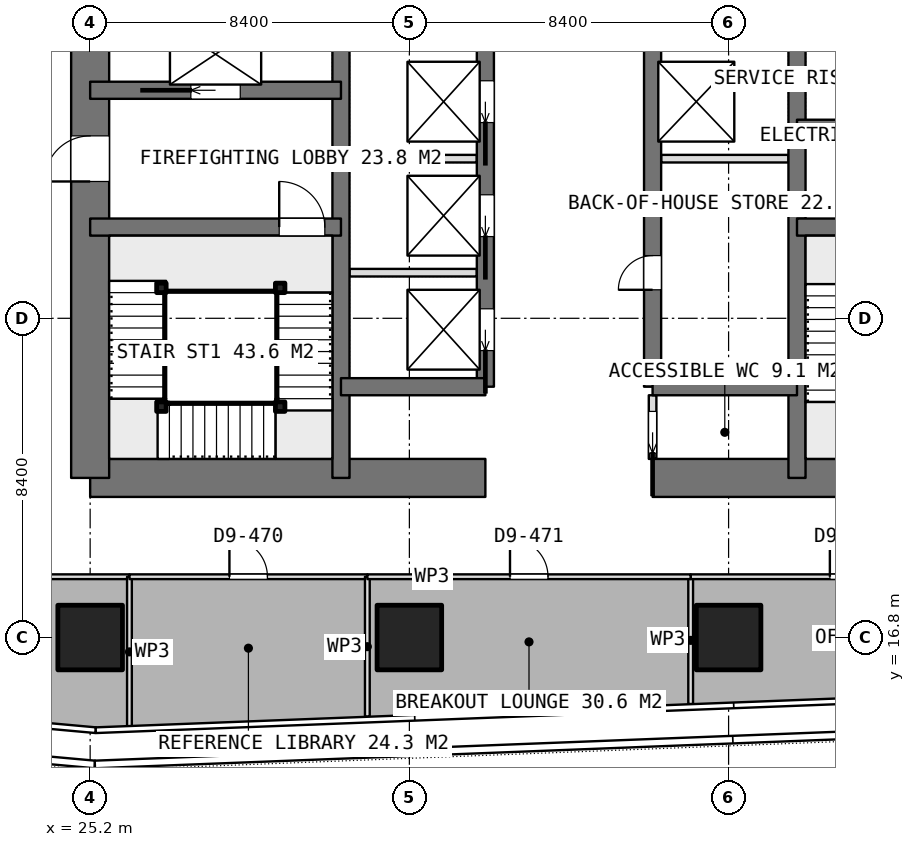
"""IFC4 building model, lengths in metres.
Left out: names, types, materials, properties, quantities, classifications, styles, units other than length and angle.
Written with IfcOpenShell. Run it as: python <this file> out.ifc"""

import sys

from ifc_helpers import new_model, si_unit, direction, frame, frame_2d, origin, origin_2d, place, context, subcontext, project, spatial, rectangle, extrude, element, fill, save


model = new_model("IFC4")
c1 = context("Model", 3, precision=1e-05, world=origin(), true_north=direction((0.0, 1.0)))
c2 = subcontext(c1, "Body", "Model", "MODEL_VIEW")
j1 = project(units=[si_unit("LENGTHUNIT", "METRE"), si_unit("PLANEANGLEUNIT", "RADIAN")], contexts=[c1])
p1 = place(None, origin())
s1 = spatial("IfcSite", under=j1, at=p1, CompositionType="ELEMENT")
p2 = place(p1, origin())
s2 = spatial("IfcBuilding", under=s1, at=p2, CompositionType="ELEMENT")
p3 = place(p2, frame((0.0, 0.0, 125.3)))
s3 = spatial("IfcBuildingStorey", under=s2, at=p3, CompositionType="ELEMENT", Elevation=125.3)
p4 = place(p3, frame((25.2, 21.0, 0.0), z_axis=(0.0, 0.0, 1.0), x_axis=(1.0, 0.0, 0.0)))
e1 = element("IfcWall", 1, at=p4, inside=s3, PredefinedType="SHEAR", context=c2, shape_type="SweptSolid", body=[
    extrude(rectangle(XDim=10.4, YDim=1.0, at=frame_2d((5.2, 0.0))), origin(), (0.0, 0.0, 1.0), 3.75),
])
p5 = place(p3, frame((40.0, 21.0, 0.0), z_axis=(0.0, 0.0, 1.0), x_axis=(1.0, 0.0, 0.0)))
e2 = element("IfcWall", 2, at=p5, inside=s3, PredefinedType="SHEAR", context=c2, shape_type="SweptSolid", body=[
    extrude(rectangle(XDim=10.4, YDim=1.0, at=frame_2d((5.2, 0.0))), origin(), (0.0, 0.0, 1.0), 3.75),
])
p6 = place(p3, frame((25.2, 21.0, 0.0), z_axis=(0.0, 0.0, 1.0), x_axis=(0.0, 1.0, 0.0)))
e3 = element("IfcWall", 3, at=p6, inside=s3, PredefinedType="SHEAR", context=c2, shape_type="SweptSolid", body=[
    extrude(rectangle(XDim=25.2, YDim=1.0, at=frame_2d((12.6, 0.0))), origin(), (0.0, 0.0, 1.0), 3.75),
])
p7 = place(p6, frame((7.8, 0.0, 0.0)))
e4 = element("IfcOpeningElement", 4, at=p7, cuts=e3, PredefinedType="OPENING", context=c2, shape_type="SweptSolid", body=[
    extrude(rectangle(XDim=1.2, YDim=2.1, at=frame_2d((0.6, 1.05))), frame((0.0, 0.51, 0.0), z_axis=(0.0, -1.0, 0.0), x_axis=(1.0, 0.0, 0.0)), (0.0, 0.0, 1.0), 1.02),
])
p8 = place(p6, frame((14.25, 0.0, 0.0)))
e5 = element("IfcOpeningElement", 5, at=p8, cuts=e3, PredefinedType="OPENING", context=c2, shape_type="SweptSolid", body=[
    extrude(rectangle(XDim=0.9, YDim=2.1, at=frame_2d((0.45, 1.05))), frame((0.0, 0.51, 0.0), z_axis=(0.0, -1.0, 0.0), x_axis=(1.0, 0.0, 0.0)), (0.0, 0.0, 1.0), 1.02),
])
p9 = place(p6, frame((16.85, 0.0, 0.0)))
e6 = element("IfcOpeningElement", 6, at=p9, cuts=e3, PredefinedType="OPENING", context=c2, shape_type="SweptSolid", body=[
    extrude(rectangle(XDim=0.9, YDim=2.1, at=frame_2d((0.45, 1.05))), frame((0.0, 0.51, 0.0), z_axis=(0.0, -1.0, 0.0), x_axis=(1.0, 0.0, 0.0)), (0.0, 0.0, 1.0), 1.02),
])
p10 = place(p6, frame((19.025, 0.0, 0.0)))
e7 = element("IfcOpeningElement", 7, at=p10, cuts=e3, PredefinedType="OPENING", context=c2, shape_type="SweptSolid", body=[
    extrude(rectangle(XDim=1.2, YDim=2.1, at=frame_2d((0.6, 1.05))), frame((0.0, 0.51, 0.0), z_axis=(0.0, -1.0, 0.0), x_axis=(1.0, 0.0, 0.0)), (0.0, 0.0, 1.0), 1.02),
])
for number, where, z_axis, x_axis in (
    (8, (31.8, 21.0, 0.0), (0.0, 0.0, 1.0), (0.0, 1.0, 0.0)),
    (9, (43.8, 21.0, 0.0), (0.0, 0.0, 1.0), (0.0, 1.0, 0.0)),
):
    element("IfcWall", number, at=place(p3, frame(where, z_axis=z_axis, x_axis=x_axis)), inside=s3, PredefinedType="SHEAR", context=c2, shape_type="SweptSolid", body=[
        extrude(rectangle(XDim=25.2, YDim=0.45, at=frame_2d((12.6, 0.0))), origin(), (0.0, 0.0, 1.0), 3.75),
    ])
p11 = place(p3, frame((35.6, 23.4, 0.0), z_axis=(0.0, 0.0, 1.0), x_axis=(0.0, 1.0, 0.0)))
e10 = element("IfcWall", 10, at=p11, inside=s3, PredefinedType="SHEAR", context=c2, shape_type="SweptSolid", body=[
    extrude(rectangle(XDim=18.0, YDim=0.45, at=frame_2d((9.0, 0.0))), origin(), (0.0, 0.0, 1.0), 3.75),
])
p12 = place(p11, frame((0.95, 0.0, 0.0)))
e11 = element("IfcOpeningElement", 11, at=p12, cuts=e10, PredefinedType="OPENING", context=c2, shape_type="SweptSolid", body=[
    extrude(rectangle(XDim=1.1, YDim=2.1, at=frame_2d((0.55, 1.05))), frame((0.0, 0.235, 0.0), z_axis=(0.0, -1.0, 0.0), x_axis=(1.0, 0.0, 0.0)), (0.0, 0.0, 1.0), 0.47),
])
p13 = place(p11, frame((3.95, 0.0, 0.0)))
e12 = element("IfcOpeningElement", 12, at=p13, cuts=e10, PredefinedType="OPENING", context=c2, shape_type="SweptSolid", body=[
    extrude(rectangle(XDim=1.1, YDim=2.1, at=frame_2d((0.55, 1.05))), frame((0.0, 0.235, 0.0), z_axis=(0.0, -1.0, 0.0), x_axis=(1.0, 0.0, 0.0)), (0.0, 0.0, 1.0), 0.47),
])
p14 = place(p11, frame((6.95, 0.0, 0.0)))
e13 = element("IfcOpeningElement", 13, at=p14, cuts=e10, PredefinedType="OPENING", context=c2, shape_type="SweptSolid", body=[
    extrude(rectangle(XDim=1.1, YDim=2.1, at=frame_2d((0.55, 1.05))), frame((0.0, 0.235, 0.0), z_axis=(0.0, -1.0, 0.0), x_axis=(1.0, 0.0, 0.0)), (0.0, 0.0, 1.0), 0.47),
])
p15 = place(p11, frame((9.95, 0.0, 0.0)))
e14 = element("IfcOpeningElement", 14, at=p15, cuts=e10, PredefinedType="OPENING", context=c2, shape_type="SweptSolid", body=[
    extrude(rectangle(XDim=1.1, YDim=2.1, at=frame_2d((0.55, 1.05))), frame((0.0, 0.235, 0.0), z_axis=(0.0, -1.0, 0.0), x_axis=(1.0, 0.0, 0.0)), (0.0, 0.0, 1.0), 0.47),
])
p16 = place(p11, frame((12.95, 0.0, 0.0)))
e15 = element("IfcOpeningElement", 15, at=p16, cuts=e10, PredefinedType="OPENING", context=c2, shape_type="SweptSolid", body=[
    extrude(rectangle(XDim=1.1, YDim=2.1, at=frame_2d((0.55, 1.05))), frame((0.0, 0.235, 0.0), z_axis=(0.0, -1.0, 0.0), x_axis=(1.0, 0.0, 0.0)), (0.0, 0.0, 1.0), 0.47),
])
p17 = place(p11, frame((15.95, 0.0, 0.0)))
e16 = element("IfcOpeningElement", 16, at=p17, cuts=e10, PredefinedType="OPENING", context=c2, shape_type="SweptSolid", body=[
    extrude(rectangle(XDim=1.1, YDim=2.1, at=frame_2d((0.55, 1.05))), frame((0.0, 0.235, 0.0), z_axis=(0.0, -1.0, 0.0), x_axis=(1.0, 0.0, 0.0)), (0.0, 0.0, 1.0), 0.47),
])
p18 = place(p3, frame((40.0, 23.4, 0.0), z_axis=(0.0, 0.0, 1.0), x_axis=(0.0, 1.0, 0.0)))
e17 = element("IfcWall", 17, at=p18, inside=s3, PredefinedType="SHEAR", context=c2, shape_type="SweptSolid", body=[
    extrude(rectangle(XDim=18.0, YDim=0.45, at=frame_2d((9.0, 0.0))), origin(), (0.0, 0.0, 1.0), 3.75),
])
p19 = place(p18, frame((2.55, 0.0, 0.0)))
e18 = element("IfcOpeningElement", 18, at=p19, cuts=e17, PredefinedType="OPENING", context=c2, shape_type="SweptSolid", body=[
    extrude(rectangle(XDim=0.9, YDim=2.1, at=frame_2d((0.45, 1.05))), frame((0.0, 0.235, 0.0), z_axis=(0.0, -1.0, 0.0), x_axis=(1.0, 0.0, 0.0)), (0.0, 0.0, 1.0), 0.47),
])
for number, where, z_axis, x_axis in (
    (19, (31.8, 23.4, 0.0), (0.0, 0.0, 1.0), (1.0, 0.0, 0.0)),
    (20, (40.0, 23.4, 0.0), (0.0, 0.0, 1.0), (1.0, 0.0, 0.0)),
):
    element("IfcWall", number, at=place(p3, frame(where, z_axis=z_axis, x_axis=x_axis)), inside=s3, PredefinedType="SHEAR", context=c2, shape_type="SweptSolid", body=[
        extrude(rectangle(XDim=3.8, YDim=0.45, at=frame_2d((1.9, 0.0))), origin(), (0.0, 0.0, 1.0), 3.75),
    ])
p20 = place(p3, frame((25.2, 27.6, 0.0), z_axis=(0.0, 0.0, 1.0), x_axis=(1.0, 0.0, 0.0)))
e21 = element("IfcWall", 21, at=p20, inside=s3, PredefinedType="SHEAR", context=c2, shape_type="SweptSolid", body=[
    extrude(rectangle(XDim=6.6, YDim=0.45, at=frame_2d((3.3, 0.0))), origin(), (0.0, 0.0, 1.0), 3.75),
])
p21 = place(p20, frame((4.975, 0.0, 0.0)))
e22 = element("IfcOpeningElement", 22, at=p21, cuts=e21, PredefinedType="OPENING", context=c2, shape_type="SweptSolid", body=[
    extrude(rectangle(XDim=1.2, YDim=2.1, at=frame_2d((0.6, 1.05))), frame((0.0, 0.235, 0.0), z_axis=(0.0, -1.0, 0.0), x_axis=(1.0, 0.0, 0.0)), (0.0, 0.0, 1.0), 0.47),
])
p22 = place(p3, frame((25.2, 31.2, 0.0), z_axis=(0.0, 0.0, 1.0), x_axis=(1.0, 0.0, 0.0)))
e23 = element("IfcWall", 23, at=p22, inside=s3, PredefinedType="SHEAR", context=c2, shape_type="SweptSolid", body=[
    extrude(rectangle(XDim=6.6, YDim=0.45, at=frame_2d((3.3, 0.0))), origin(), (0.0, 0.0, 1.0), 3.75),
])
p23 = place(p22, frame((2.65, 0.0, 0.0)))
e24 = element("IfcOpeningElement", 24, at=p23, cuts=e23, PredefinedType="OPENING", context=c2, shape_type="SweptSolid", body=[
    extrude(rectangle(XDim=1.3, YDim=2.1, at=frame_2d((0.65, 1.05))), frame((0.0, 0.235, 0.0), z_axis=(0.0, -1.0, 0.0), x_axis=(1.0, 0.0, 0.0)), (0.0, 0.0, 1.0), 0.47),
])
for number, where, z_axis, x_axis in (
    (25, (43.8, 27.6, 0.0), (0.0, 0.0, 1.0), (1.0, 0.0, 0.0)),
    (26, (43.8, 30.2, 0.0), (0.0, 0.0, 1.0), (1.0, 0.0, 0.0)),
):
    element("IfcWall", number, at=place(p3, frame(where, z_axis=z_axis, x_axis=x_axis)), inside=s3, PredefinedType="SHEAR", context=c2, shape_type="SweptSolid", body=[
        extrude(rectangle(XDim=6.6, YDim=0.45, at=frame_2d((3.3, 0.0))), origin(), (0.0, 0.0, 1.0), 3.75),
    ])
for number, where, z_axis, x_axis in (
    (27, (25.2, 16.8, 0.0), (0.0, 0.0, 1.0), (1.0, 0.0, 0.0)),
    (28, (33.6, 16.8, 0.0), (0.0, 0.0, 1.0), (1.0, 0.0, 0.0)),
    (29, (42.0, 16.8, 0.0), (0.0, 0.0, 1.0), (1.0, 0.0, 0.0)),
):
    element("IfcColumn", number, at=place(p3, frame(where, z_axis=z_axis, x_axis=x_axis)), inside=s3, PredefinedType="COLUMN", context=c2, shape_type="SweptSolid", body=[
        extrude(rectangle(XDim=1.7, YDim=1.7, at=origin_2d()), origin(), (0.0, 0.0, 1.0), 3.75),
    ])
for number, where, z_axis, x_axis in (
    (30, (32.025, 26.4, 0.0), (0.0, 0.0, 1.0), (1.0, 0.0, 0.0)),
    (31, (32.025, 29.4, 0.0), (0.0, 0.0, 1.0), (1.0, 0.0, 0.0)),
):
    element("IfcWall", number, at=place(p3, frame(where, z_axis=z_axis, x_axis=x_axis)), inside=s3, PredefinedType="PARTITIONING", context=c2, shape_type="SweptSolid", body=[
        extrude(rectangle(XDim=3.35, YDim=0.2, at=frame_2d((1.675, 0.0))), origin(), (0.0, 0.0, 1.0), 3.5),
    ])
p24 = place(p3, frame((40.225, 29.4, 0.0), z_axis=(0.0, 0.0, 1.0), x_axis=(1.0, 0.0, 0.0)))
e32 = element("IfcWall", 32, at=p24, inside=s3, PredefinedType="PARTITIONING", context=c2, shape_type="SweptSolid", body=[
    extrude(rectangle(XDim=3.35, YDim=0.2, at=frame_2d((1.675, 0.0))), origin(), (0.0, 0.0, 1.0), 3.5),
])
p25 = place(p3, frame((40.0, 21.5, 0.0), z_axis=(0.0, 0.0, 1.0), x_axis=(0.0, 1.0, 0.0)))
e33 = element("IfcWall", 33, at=p25, inside=s3, PredefinedType="PARTITIONING", context=c2, shape_type="SweptSolid", body=[
    extrude(rectangle(XDim=1.675, YDim=0.2, at=frame_2d((0.837, 0.0))), origin(), (0.0, 0.0, 1.0), 3.5),
])
p26 = place(p25, frame((0.15, 0.0, 0.0)))
e34 = element("IfcOpeningElement", 34, at=p26, cuts=e33, PredefinedType="OPENING", context=c2, shape_type="SweptSolid", body=[
    extrude(rectangle(XDim=1.1, YDim=2.1, at=frame_2d((0.55, 1.05))), frame((0.0, 0.11, 0.0), z_axis=(0.0, -1.0, 0.0), x_axis=(1.0, 0.0, 0.0)), (0.0, 0.0, 1.0), 0.22),
])
p27 = place(p3, frame((41.002, 15.051, 0.0), z_axis=(0.0, 0.0, 1.0), x_axis=(0.0, 1.0, 0.0)))
e35 = element("IfcWall", 35, at=p27, inside=s3, PredefinedType="PARTITIONING", context=c2, shape_type="SweptSolid", body=[
    extrude(rectangle(XDim=3.349, YDim=0.125, at=frame_2d((1.674, 0.0))), origin(), (0.0, 0.0, 1.0), 3.5),
])
p28 = place(p3, frame((41.002, 18.4, 0.0), z_axis=(0.0, 0.0, 1.0), x_axis=(1.0, 0.0, 0.0)))
e36 = element("IfcWall", 36, at=p28, inside=s3, PredefinedType="PARTITIONING", context=c2, shape_type="SweptSolid", body=[
    extrude(rectangle(XDim=8.327, YDim=0.125, at=frame_2d((4.164, 0.0))), origin(), (0.0, 0.0, 1.0), 3.5),
])
p29 = place(p28, frame((3.663, 0.0, 0.0)))
e37 = element("IfcOpeningElement", 37, at=p29, cuts=e36, PredefinedType="OPENING", context=c2, shape_type="SweptSolid", body=[
    extrude(rectangle(XDim=1.0, YDim=2.1, at=frame_2d((0.5, 1.05))), frame((0.0, 0.073, 0.0), z_axis=(0.0, -1.0, 0.0), x_axis=(1.0, 0.0, 0.0)), (0.0, 0.0, 1.0), 0.145),
])
p30 = place(p3, frame((19.2, 18.4, 0.0), z_axis=(0.0, 0.0, 1.0), x_axis=(1.0, 0.0, 0.0)))
e38 = element("IfcWall", 38, at=p30, inside=s3, PredefinedType="PARTITIONING", context=c2, shape_type="SweptSolid", body=[
    extrude(rectangle(XDim=7.034, YDim=0.125, at=frame_2d((3.517, 0.0))), origin(), (0.0, 0.0, 1.0), 3.5),
])
p31 = place(p30, frame((3.017, 0.0, 0.0)))
e39 = element("IfcOpeningElement", 39, at=p31, cuts=e38, PredefinedType="OPENING", context=c2, shape_type="SweptSolid", body=[
    extrude(rectangle(XDim=1.0, YDim=2.1, at=frame_2d((0.5, 1.05))), frame((0.0, 0.073, 0.0), z_axis=(0.0, -1.0, 0.0), x_axis=(1.0, 0.0, 0.0)), (0.0, 0.0, 1.0), 0.145),
])
p32 = place(p3, frame((26.234, 18.4, 0.0), z_axis=(0.0, 0.0, 1.0), x_axis=(0.0, -1.0, 0.0)))
e40 = element("IfcWall", 40, at=p32, inside=s3, PredefinedType="PARTITIONING", context=c2, shape_type="SweptSolid", body=[
    extrude(rectangle(XDim=3.954, YDim=0.125, at=frame_2d((1.977, 0.0))), origin(), (0.0, 0.0, 1.0), 3.5),
])
p33 = place(p3, frame((26.235, 18.4, 0.0), z_axis=(0.0, 0.0, 1.0), x_axis=(1.0, 0.0, 0.0)))
e41 = element("IfcWall", 41, at=p33, inside=s3, PredefinedType="PARTITIONING", context=c2, shape_type="SweptSolid", body=[
    extrude(rectangle(XDim=6.259, YDim=0.125, at=frame_2d((3.129, 0.0))), origin(), (0.0, 0.0, 1.0), 3.5),
])
p34 = place(p33, frame((2.63, 0.0, 0.0)))
e42 = element("IfcOpeningElement", 42, at=p34, cuts=e41, PredefinedType="OPENING", context=c2, shape_type="SweptSolid", body=[
    extrude(rectangle(XDim=1.0, YDim=2.1, at=frame_2d((0.5, 1.05))), frame((0.0, 0.073, 0.0), z_axis=(0.0, -1.0, 0.0), x_axis=(1.0, 0.0, 0.0)), (0.0, 0.0, 1.0), 0.145),
])
p35 = place(p3, frame((32.494, 18.4, 0.0), z_axis=(0.0, 0.0, 1.0), x_axis=(0.0, -1.0, 0.0)))
e43 = element("IfcWall", 43, at=p35, inside=s3, PredefinedType="PARTITIONING", context=c2, shape_type="SweptSolid", body=[
    extrude(rectangle(XDim=3.68, YDim=0.125, at=frame_2d((1.84, 0.0))), origin(), (0.0, 0.0, 1.0), 3.5),
])
p36 = place(p3, frame((32.495, 18.4, 0.0), z_axis=(0.0, 0.0, 1.0), x_axis=(1.0, 0.0, 0.0)))
e44 = element("IfcWall", 44, at=p36, inside=s3, PredefinedType="PARTITIONING", context=c2, shape_type="SweptSolid", body=[
    extrude(rectangle(XDim=8.506, YDim=0.125, at=frame_2d((4.253, 0.0))), origin(), (0.0, 0.0, 1.0), 3.5),
])
p37 = place(p36, frame((3.753, 0.0, 0.0)))
e45 = element("IfcOpeningElement", 45, at=p37, cuts=e44, PredefinedType="OPENING", context=c2, shape_type="SweptSolid", body=[
    extrude(rectangle(XDim=1.0, YDim=2.1, at=frame_2d((0.5, 1.05))), frame((0.0, 0.073, 0.0), z_axis=(0.0, -1.0, 0.0), x_axis=(1.0, 0.0, 0.0)), (0.0, 0.0, 1.0), 0.145),
])
for number, where, z_axis, x_axis in (
    (46, (30.2, 26.0, 0.0), (0.0, 0.0, 1.0), (1.0, 0.0, 0.0)),
    (47, (30.2, 22.875, 0.0), (0.0, 0.0, 1.0), (1.0, 0.0, 0.0)),
    (48, (27.075, 22.875, 0.0), (0.0, 0.0, 1.0), (1.0, 0.0, 0.0)),
    (49, (27.075, 26.0, 0.0), (0.0, 0.0, 1.0), (1.0, 0.0, 0.0)),
):
    element("IfcColumn", number, at=place(p3, frame(where, z_axis=z_axis, x_axis=x_axis)), inside=s3, PredefinedType="COLUMN", context=c2, shape_type="SweptSolid", body=[
        extrude(rectangle(XDim=0.25, YDim=0.25, at=origin_2d()), origin(), (0.0, 0.0, 1.0), 3.75),
    ])
p38 = place(p7, origin())
e50 = element("IfcDoor", 50, at=p38, inside=s3, OperationType="SINGLE_SWING_LEFT", PredefinedType="DOOR", context=c2, shape_type="SweptSolid", body=[
    extrude(rectangle(XDim=1.2, YDim=2.1, at=frame_2d((0.6, 1.05))), frame((0.0, 0.025, 0.0), z_axis=(0.0, -1.0, 0.0), x_axis=(1.0, 0.0, 0.0)), (0.0, 0.0, 1.0), 0.05),
])
fill(e4, e50)
p39 = place(p26, origin())
e51 = element("IfcDoor", 51, at=p39, inside=s3, OperationType="SLIDING_TO_LEFT", PredefinedType="DOOR", context=c2, shape_type="SweptSolid", body=[
    extrude(rectangle(XDim=1.1, YDim=2.1, at=frame_2d((0.55, 1.05))), frame((0.0, 0.025, 0.0), z_axis=(0.0, -1.0, 0.0), x_axis=(1.0, 0.0, 0.0)), (0.0, 0.0, 1.0), 0.05),
])
fill(e34, e51)
p40 = place(p19, origin())
e52 = element("IfcDoor", 52, at=p40, inside=s3, OperationType="SINGLE_SWING_LEFT", PredefinedType="DOOR", context=c2, shape_type="SweptSolid", body=[
    extrude(rectangle(XDim=0.9, YDim=2.1, at=frame_2d((0.45, 1.05))), frame((0.0, 0.025, 0.0), z_axis=(0.0, -1.0, 0.0), x_axis=(1.0, 0.0, 0.0)), (0.0, 0.0, 1.0), 0.05),
])
fill(e18, e52)
p41 = place(p12, origin())
e53 = element("IfcDoor", 53, at=p41, inside=s3, OperationType="SLIDING_TO_LEFT", PredefinedType="USERDEFINED", context=c2, shape_type="SweptSolid", body=[
    extrude(rectangle(XDim=1.1, YDim=2.1, at=frame_2d((0.55, 1.05))), frame((0.0, 0.025, 0.0), z_axis=(0.0, -1.0, 0.0), x_axis=(1.0, 0.0, 0.0)), (0.0, 0.0, 1.0), 0.05),
])
fill(e11, e53)
p42 = place(p13, origin())
e54 = element("IfcDoor", 54, at=p42, inside=s3, OperationType="SLIDING_TO_LEFT", PredefinedType="USERDEFINED", context=c2, shape_type="SweptSolid", body=[
    extrude(rectangle(XDim=1.1, YDim=2.1, at=frame_2d((0.55, 1.05))), frame((0.0, 0.025, 0.0), z_axis=(0.0, -1.0, 0.0), x_axis=(1.0, 0.0, 0.0)), (0.0, 0.0, 1.0), 0.05),
])
fill(e12, e54)
p43 = place(p14, origin())
e55 = element("IfcDoor", 55, at=p43, inside=s3, OperationType="SLIDING_TO_LEFT", PredefinedType="USERDEFINED", context=c2, shape_type="SweptSolid", body=[
    extrude(rectangle(XDim=1.1, YDim=2.1, at=frame_2d((0.55, 1.05))), frame((0.0, 0.025, 0.0), z_axis=(0.0, -1.0, 0.0), x_axis=(1.0, 0.0, 0.0)), (0.0, 0.0, 1.0), 0.05),
])
fill(e13, e55)
p44 = place(p23, origin())
e56 = element("IfcDoor", 56, at=p44, inside=s3, OperationType="SLIDING_TO_LEFT", PredefinedType="USERDEFINED", context=c2, shape_type="SweptSolid", body=[
    extrude(rectangle(XDim=1.3, YDim=2.1, at=frame_2d((0.65, 1.05))), frame((0.0, 0.025, 0.0), z_axis=(0.0, -1.0, 0.0), x_axis=(1.0, 0.0, 0.0)), (0.0, 0.0, 1.0), 0.05),
])
fill(e24, e56)
p45 = place(p29, origin())
e57 = element("IfcDoor", 57, at=p45, inside=s3, OperationType="SINGLE_SWING_LEFT", PredefinedType="DOOR", context=c2, shape_type="SweptSolid", body=[
    extrude(rectangle(XDim=1.0, YDim=2.1, at=frame_2d((0.5, 1.05))), frame((0.0, 0.025, 0.0), z_axis=(0.0, -1.0, 0.0), x_axis=(1.0, 0.0, 0.0)), (0.0, 0.0, 1.0), 0.05),
])
fill(e37, e57)
p46 = place(p34, origin())
e58 = element("IfcDoor", 58, at=p46, inside=s3, OperationType="SINGLE_SWING_LEFT", PredefinedType="DOOR", context=c2, shape_type="SweptSolid", body=[
    extrude(rectangle(XDim=1.0, YDim=2.1, at=frame_2d((0.5, 1.05))), frame((0.0, 0.025, 0.0), z_axis=(0.0, -1.0, 0.0), x_axis=(1.0, 0.0, 0.0)), (0.0, 0.0, 1.0), 0.05),
])
fill(e42, e58)
p47 = place(p37, origin())
e59 = element("IfcDoor", 59, at=p47, inside=s3, OperationType="SINGLE_SWING_LEFT", PredefinedType="DOOR", context=c2, shape_type="SweptSolid", body=[
    extrude(rectangle(XDim=1.0, YDim=2.1, at=frame_2d((0.5, 1.05))), frame((0.0, 0.025, 0.0), z_axis=(0.0, -1.0, 0.0), x_axis=(1.0, 0.0, 0.0)), (0.0, 0.0, 1.0), 0.05),
])
fill(e45, e59)
p48 = place(p21, origin())
e60 = element("IfcDoor", 60, at=p48, inside=s3, OperationType="SINGLE_SWING_RIGHT", PredefinedType="DOOR", context=c2, shape_type="SweptSolid", body=[
    extrude(rectangle(XDim=1.2, YDim=2.1, at=frame_2d((0.6, 1.05))), frame((0.0, 0.025, 0.0), z_axis=(0.0, -1.0, 0.0), x_axis=(1.0, 0.0, 0.0)), (0.0, 0.0, 1.0), 0.05),
])
fill(e22, e60)
save(model, sys.argv[1])
